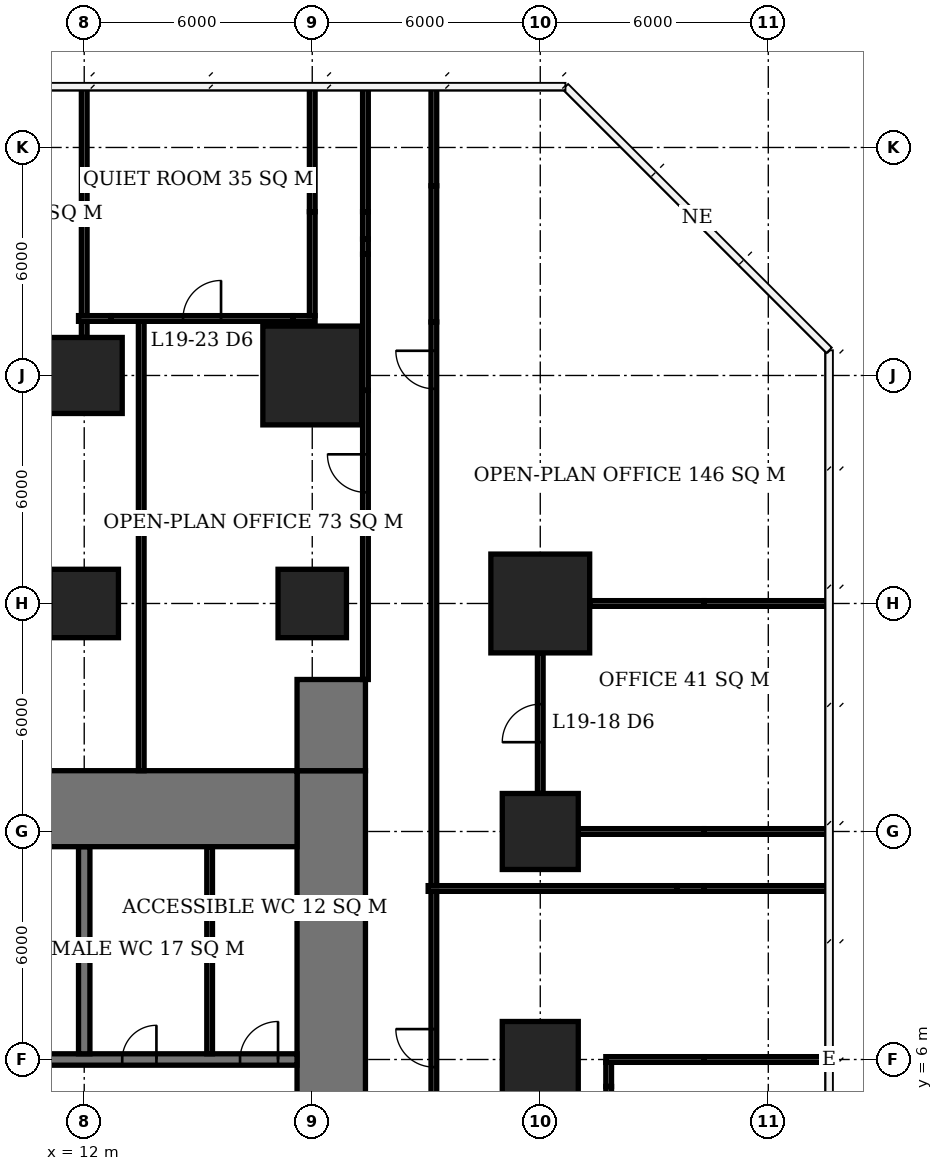
"""IFC4 building model, lengths in metres.
Left out: names, types, materials, properties, quantities, classifications, styles, units other than length and angle.
Written with IfcOpenShell. Run it as: python <this file> out.ifc"""

import sys

from ifc_helpers import new_model, si_unit, direction, frame, frame_2d, origin, origin_2d, place, context, subcontext, project, spatial, rectangle, extrude, element, fill, save


model = new_model("IFC4")
c1 = context("Model", 3, precision=1e-05, world=origin(), true_north=direction((0.0, 1.0)))
c2 = subcontext(c1, "Body", "Model", "MODEL_VIEW")
j1 = project(units=[si_unit("LENGTHUNIT", "METRE"), si_unit("PLANEANGLEUNIT", "RADIAN")], contexts=[c1])
p1 = place(None, origin())
s1 = spatial("IfcSite", under=j1, at=p1, CompositionType="ELEMENT")
p2 = place(p1, origin())
s2 = spatial("IfcBuilding", under=s1, at=p2, CompositionType="ELEMENT")
p3 = place(p2, frame((0.0, 0.0, 80.6)))
s3 = spatial("IfcBuildingStorey", under=s2, at=p3, CompositionType="ELEMENT", Elevation=80.6)
p4 = place(p3, frame((12.0, 18.0, 0.0), z_axis=(0.0, 0.0, 1.0), x_axis=(1.0, 0.0, 0.0)))
e1 = element("IfcColumn", 1, at=p4, inside=s3, PredefinedType="COLUMN", context=c2, shape_type="SweptSolid", body=[
    extrude(rectangle(XDim=1.8, YDim=1.8, at=origin_2d()), origin(), (0.0, 0.0, 1.0), 3.9),
])
p5 = place(p3, frame((12.0, 24.0, 0.0), z_axis=(0.0, 0.0, 1.0), x_axis=(1.0, 0.0, 0.0)))
e2 = element("IfcColumn", 2, at=p5, inside=s3, PredefinedType="COLUMN", context=c2, shape_type="SweptSolid", body=[
    extrude(rectangle(XDim=2.0, YDim=2.0, at=origin_2d()), origin(), (0.0, 0.0, 1.0), 3.9),
])
p6 = place(p3, frame((18.0, 18.0, 0.0), z_axis=(0.0, 0.0, 1.0), x_axis=(1.0, 0.0, 0.0)))
e3 = element("IfcColumn", 3, at=p6, inside=s3, PredefinedType="COLUMN", context=c2, shape_type="SweptSolid", body=[
    extrude(rectangle(XDim=1.8, YDim=1.8, at=origin_2d()), origin(), (0.0, 0.0, 1.0), 3.9),
])
p7 = place(p3, frame((18.0, 24.0, 0.0), z_axis=(0.0, 0.0, 1.0), x_axis=(1.0, 0.0, 0.0)))
e4 = element("IfcColumn", 4, at=p7, inside=s3, PredefinedType="COLUMN", context=c2, shape_type="SweptSolid", body=[
    extrude(rectangle(XDim=2.6, YDim=2.6, at=origin_2d()), origin(), (0.0, 0.0, 1.0), 3.9),
])
for number, where, z_axis, x_axis in (
    (5, (24.0, 6.0, 0.0), (0.0, 0.0, 1.0), (1.0, 0.0, 0.0)),
    (6, (24.0, 12.0, 0.0), (0.0, 0.0, 1.0), (1.0, 0.0, 0.0)),
):
    element("IfcColumn", number, at=place(p3, frame(where, z_axis=z_axis, x_axis=x_axis)), inside=s3, PredefinedType="COLUMN", context=c2, shape_type="SweptSolid", body=[
        extrude(rectangle(XDim=2.0, YDim=2.0, at=origin_2d()), origin(), (0.0, 0.0, 1.0), 3.9),
    ])
p8 = place(p3, frame((24.0, 18.0, 0.0), z_axis=(0.0, 0.0, 1.0), x_axis=(1.0, 0.0, 0.0)))
e7 = element("IfcColumn", 7, at=p8, inside=s3, PredefinedType="COLUMN", context=c2, shape_type="SweptSolid", body=[
    extrude(rectangle(XDim=2.6, YDim=2.6, at=origin_2d()), origin(), (0.0, 0.0, 1.0), 3.9),
])
p9 = place(p3, frame((-5.6, 12.6, 0.0), z_axis=(0.0, 0.0, 1.0), x_axis=(1.0, 0.0, 0.0)))
e8 = element("IfcWall", 8, at=p9, inside=s3, PredefinedType="SHEAR", context=c2, shape_type="SweptSolid", body=[
    extrude(rectangle(XDim=23.2, YDim=2.0, at=frame_2d((11.6, 0.0))), origin(), (0.0, 0.0, 1.0), 3.9),
])
p10 = place(p3, frame((18.5, -7.6, 0.0), z_axis=(0.0, 0.0, 1.0), x_axis=(0.0, 1.0, 0.0)))
e9 = element("IfcWall", 9, at=p10, inside=s3, PredefinedType="SHEAR", context=c2, shape_type="SweptSolid", body=[
    extrude(rectangle(XDim=21.2, YDim=1.8, at=frame_2d((10.6, 0.0))), origin(), (0.0, 0.0, 1.0), 3.9),
])
p11 = place(p10, frame((9.2, 0.0, 0.0)))
e10 = element("IfcOpeningElement", 10, at=p11, cuts=e9, PredefinedType="OPENING", context=c2, shape_type="SweptSolid", body=[
    extrude(rectangle(XDim=1.8, YDim=2.4, at=frame_2d((0.9, 1.2))), frame((0.0, 0.91, 0.0), z_axis=(0.0, -1.0, 0.0), x_axis=(1.0, 0.0, 0.0)), (0.0, 0.0, 1.0), 1.82),
])
p12 = place(p3, frame((18.5, 13.6, 0.0), z_axis=(0.0, 0.0, 1.0), x_axis=(0.0, 1.0, 0.0)))
e11 = element("IfcWall", 11, at=p12, inside=s3, PredefinedType="SHEAR", context=c2, shape_type="SweptSolid", body=[
    extrude(rectangle(XDim=2.4, YDim=1.8, at=frame_2d((1.2, 0.0))), origin(), (0.0, 0.0, 1.0), 3.9),
])
p13 = place(p3, frame((-0.15, 6.0, 0.0), z_axis=(0.0, 0.0, 1.0), x_axis=(1.0, 0.0, 0.0)))
e12 = element("IfcWall", 12, at=p13, inside=s3, PredefinedType="SHEAR", context=c2, shape_type="SweptSolid", body=[
    extrude(rectangle(XDim=17.75, YDim=0.3, at=frame_2d((8.875, 0.0))), origin(), (0.0, 0.0, 1.0), 3.9),
])
p14 = place(p13, frame((13.15, 0.0, 0.0)))
e13 = element("IfcOpeningElement", 13, at=p14, cuts=e12, PredefinedType="OPENING", context=c2, shape_type="SweptSolid", body=[
    extrude(rectangle(XDim=0.9, YDim=2.1, at=frame_2d((0.45, 1.05))), frame((0.0, 0.16, 0.0), z_axis=(0.0, -1.0, 0.0), x_axis=(1.0, 0.0, 0.0)), (0.0, 0.0, 1.0), 0.32),
])
p15 = place(p13, frame((16.25, 0.0, 0.0)))
e14 = element("IfcOpeningElement", 14, at=p15, cuts=e12, PredefinedType="OPENING", context=c2, shape_type="SweptSolid", body=[
    extrude(rectangle(XDim=1.0, YDim=2.1, at=frame_2d((0.5, 1.05))), frame((0.0, 0.16, 0.0), z_axis=(0.0, -1.0, 0.0), x_axis=(1.0, 0.0, 0.0)), (0.0, 0.0, 1.0), 0.32),
])
p16 = place(p13, frame((1.1, 0.0, 0.0)))
e15 = element("IfcOpeningElement", 15, at=p16, cuts=e12, PredefinedType="OPENING", context=c2, shape_type="SweptSolid", body=[
    extrude(rectangle(XDim=1.1, YDim=2.1, at=frame_2d((0.55, 1.05))), frame((0.0, 0.16, 0.0), z_axis=(0.0, -1.0, 0.0), x_axis=(1.0, 0.0, 0.0)), (0.0, 0.0, 1.0), 0.32),
])
p17 = place(p13, frame((4.1, 0.0, 0.0)))
e16 = element("IfcOpeningElement", 16, at=p17, cuts=e12, PredefinedType="OPENING", context=c2, shape_type="SweptSolid", body=[
    extrude(rectangle(XDim=1.1, YDim=2.1, at=frame_2d((0.55, 1.05))), frame((0.0, 0.16, 0.0), z_axis=(0.0, -1.0, 0.0), x_axis=(1.0, 0.0, 0.0)), (0.0, 0.0, 1.0), 0.32),
])
p18 = place(p13, frame((7.1, 0.0, 0.0)))
e17 = element("IfcOpeningElement", 17, at=p18, cuts=e12, PredefinedType="OPENING", context=c2, shape_type="SweptSolid", body=[
    extrude(rectangle(XDim=1.1, YDim=2.1, at=frame_2d((0.55, 1.05))), frame((0.0, 0.16, 0.0), z_axis=(0.0, -1.0, 0.0), x_axis=(1.0, 0.0, 0.0)), (0.0, 0.0, 1.0), 0.32),
])
p19 = place(p13, frame((10.1, 0.0, 0.0)))
e18 = element("IfcOpeningElement", 18, at=p19, cuts=e12, PredefinedType="OPENING", context=c2, shape_type="SweptSolid", body=[
    extrude(rectangle(XDim=1.1, YDim=2.1, at=frame_2d((0.55, 1.05))), frame((0.0, 0.16, 0.0), z_axis=(0.0, -1.0, 0.0), x_axis=(1.0, 0.0, 0.0)), (0.0, 0.0, 1.0), 0.32),
])
p20 = place(p3, frame((12.0, 6.15, 0.0), z_axis=(0.0, 0.0, 1.0), x_axis=(0.0, 1.0, 0.0)))
e19 = element("IfcWall", 19, at=p20, inside=s3, PredefinedType="SHEAR", context=c2, shape_type="SweptSolid", body=[
    extrude(rectangle(XDim=5.45, YDim=0.3, at=frame_2d((2.725, 0.0))), origin(), (0.0, 0.0, 1.0), 3.9),
])
p21 = place(p3, frame((15.3, 6.15, 0.0), z_axis=(0.0, 0.0, 1.0), x_axis=(0.0, 1.0, 0.0)))
e20 = element("IfcWall", 20, at=p21, inside=s3, PredefinedType="PLUMBINGWALL", context=c2, shape_type="SweptSolid", body=[
    extrude(rectangle(XDim=5.45, YDim=0.15, at=frame_2d((2.725, 0.0))), origin(), (0.0, 0.0, 1.0), 3.65),
])
p22 = place(p3, frame((25.725, 6.0, 0.0), z_axis=(0.0, 0.0, 1.0), x_axis=(1.0, 0.0, 0.0)))
e21 = element("IfcWall", 21, at=p22, inside=s3, PredefinedType="PARTITIONING", context=c2, shape_type="SweptSolid", body=[
    extrude(rectangle(XDim=2.585, YDim=0.15, at=frame_2d((1.292, 0.0))), origin(), (0.0, 0.0, 1.0), 2.65),
])
p23 = place(p3, frame((28.31, 6.0, 0.0), z_axis=(0.0, 0.0, 1.0), x_axis=(1.0, 0.0, 0.0)))
e22 = element("IfcWall", 22, at=p23, inside=s3, PredefinedType="PARTITIONING", context=c2, shape_type="SweptSolid", body=[
    extrude(rectangle(XDim=3.24, YDim=0.15, at=frame_2d((1.62, 0.0))), origin(), (0.0, 0.0, 1.0), 3.65),
])
p24 = place(p3, frame((25.0, 12.0, 0.0), z_axis=(0.0, 0.0, 1.0), x_axis=(1.0, 0.0, 0.0)))
e23 = element("IfcWall", 23, at=p24, inside=s3, PredefinedType="PARTITIONING", context=c2, shape_type="SweptSolid", body=[
    extrude(rectangle(XDim=3.31, YDim=0.15, at=frame_2d((1.655, 0.0))), origin(), (0.0, 0.0, 1.0), 2.65),
])
p25 = place(p3, frame((28.31, 12.0, 0.0), z_axis=(0.0, 0.0, 1.0), x_axis=(1.0, 0.0, 0.0)))
e24 = element("IfcWall", 24, at=p25, inside=s3, PredefinedType="PARTITIONING", context=c2, shape_type="SweptSolid", body=[
    extrude(rectangle(XDim=3.29, YDim=0.15, at=frame_2d((1.645, 0.0))), origin(), (0.0, 0.0, 1.0), 3.65),
])
p26 = place(p3, frame((25.3, 18.0, 0.0), z_axis=(0.0, 0.0, 1.0), x_axis=(1.0, 0.0, 0.0)))
e25 = element("IfcWall", 25, at=p26, inside=s3, PredefinedType="PARTITIONING", context=c2, shape_type="SweptSolid", body=[
    extrude(rectangle(XDim=3.01, YDim=0.15, at=frame_2d((1.505, 0.0))), origin(), (0.0, 0.0, 1.0), 2.65),
])
p27 = place(p3, frame((28.31, 18.0, 0.0), z_axis=(0.0, 0.0, 1.0), x_axis=(1.0, 0.0, 0.0)))
e26 = element("IfcWall", 26, at=p27, inside=s3, PredefinedType="PARTITIONING", context=c2, shape_type="SweptSolid", body=[
    extrude(rectangle(XDim=3.29, YDim=0.15, at=frame_2d((1.645, 0.0))), origin(), (0.0, 0.0, 1.0), 3.65),
])
p28 = place(p3, frame((11.85, 25.5, 0.0), z_axis=(0.0, 0.0, 1.0), x_axis=(1.0, 0.0, 0.0)))
e27 = element("IfcWall", 27, at=p28, inside=s3, PredefinedType="PARTITIONING", context=c2, shape_type="SweptSolid", body=[
    extrude(rectangle(XDim=0.86, YDim=0.15, at=frame_2d((0.43, 0.0))), origin(), (0.0, 0.0, 1.0), 2.65),
])
p29 = place(p3, frame((12.71, 25.5, 0.0), z_axis=(0.0, 0.0, 1.0), x_axis=(1.0, 0.0, 0.0)))
e28 = element("IfcWall", 28, at=p29, inside=s3, PredefinedType="PARTITIONING", context=c2, shape_type="SweptSolid", body=[
    extrude(rectangle(XDim=4.78, YDim=0.15, at=frame_2d((2.39, 0.0))), origin(), (0.0, 0.0, 1.0), 3.65),
])
p30 = place(p29, frame((1.89, 0.0, 0.0)))
e29 = element("IfcOpeningElement", 29, at=p30, cuts=e28, PredefinedType="OPENING", context=c2, shape_type="SweptSolid", body=[
    extrude(rectangle(XDim=1.0, YDim=2.1, at=frame_2d((0.5, 1.05))), frame((0.0, 0.085, 0.0), z_axis=(0.0, -1.0, 0.0), x_axis=(1.0, 0.0, 0.0)), (0.0, 0.0, 1.0), 0.17),
])
p31 = place(p3, frame((17.49, 25.5, 0.0), z_axis=(0.0, 0.0, 1.0), x_axis=(1.0, 0.0, 0.0)))
e30 = element("IfcWall", 30, at=p31, inside=s3, PredefinedType="PARTITIONING", context=c2, shape_type="SweptSolid", body=[
    extrude(rectangle(XDim=0.585, YDim=0.15, at=frame_2d((0.292, 0.0))), origin(), (0.0, 0.0, 1.0), 2.65),
])
p32 = place(p3, frame((12.0, 25.0, 0.0), z_axis=(0.0, 0.0, 1.0), x_axis=(0.0, 1.0, 0.0)))
e31 = element("IfcWall", 31, at=p32, inside=s3, PredefinedType="PARTITIONING", context=c2, shape_type="SweptSolid", body=[
    extrude(rectangle(XDim=0.425, YDim=0.15, at=frame_2d((0.212, 0.0))), origin(), (0.0, 0.0, 1.0), 2.65),
])
p33 = place(p3, frame((12.0, 25.575, 0.0), z_axis=(0.0, 0.0, 1.0), x_axis=(0.0, 1.0, 0.0)))
e32 = element("IfcWall", 32, at=p33, inside=s3, PredefinedType="PARTITIONING", context=c2, shape_type="SweptSolid", body=[
    extrude(rectangle(XDim=2.735, YDim=0.15, at=frame_2d((1.368, 0.0))), origin(), (0.0, 0.0, 1.0), 2.65),
])
p34 = place(p3, frame((12.0, 28.31, 0.0), z_axis=(0.0, 0.0, 1.0), x_axis=(0.0, 1.0, 0.0)))
e33 = element("IfcWall", 33, at=p34, inside=s3, PredefinedType="PARTITIONING", context=c2, shape_type="SweptSolid", body=[
    extrude(rectangle(XDim=3.29, YDim=0.15, at=frame_2d((1.645, 0.0))), origin(), (0.0, 0.0, 1.0), 3.65),
])
p35 = place(p3, frame((18.0, 25.575, 0.0), z_axis=(0.0, 0.0, 1.0), x_axis=(0.0, 1.0, 0.0)))
e34 = element("IfcWall", 34, at=p35, inside=s3, PredefinedType="PARTITIONING", context=c2, shape_type="SweptSolid", body=[
    extrude(rectangle(XDim=2.735, YDim=0.15, at=frame_2d((1.368, 0.0))), origin(), (0.0, 0.0, 1.0), 2.65),
])
p36 = place(p3, frame((18.0, 28.31, 0.0), z_axis=(0.0, 0.0, 1.0), x_axis=(0.0, 1.0, 0.0)))
e35 = element("IfcWall", 35, at=p36, inside=s3, PredefinedType="PARTITIONING", context=c2, shape_type="SweptSolid", body=[
    extrude(rectangle(XDim=3.29, YDim=0.15, at=frame_2d((1.645, 0.0))), origin(), (0.0, 0.0, 1.0), 3.65),
])
p37 = place(p3, frame((24.0, 13.0, 0.0), z_axis=(0.0, 0.0, 1.0), x_axis=(0.0, 1.0, 0.0)))
e36 = element("IfcWall", 36, at=p37, inside=s3, PredefinedType="PARTITIONING", context=c2, shape_type="SweptSolid", body=[
    extrude(rectangle(XDim=3.7, YDim=0.15, at=frame_2d((1.85, 0.0))), origin(), (0.0, 0.0, 1.0), 3.65),
])
p38 = place(p37, frame((1.35, 0.0, 0.0)))
e37 = element("IfcOpeningElement", 37, at=p38, cuts=e36, PredefinedType="OPENING", context=c2, shape_type="SweptSolid", body=[
    extrude(rectangle(XDim=1.0, YDim=2.1, at=frame_2d((0.5, 1.05))), frame((0.0, 0.085, 0.0), z_axis=(0.0, -1.0, 0.0), x_axis=(1.0, 0.0, 0.0)), (0.0, 0.0, 1.0), 0.17),
])
p39 = place(p3, frame((25.8, 0.71, 0.0), z_axis=(0.0, 0.0, 1.0), x_axis=(0.0, 1.0, 0.0)))
e38 = element("IfcWall", 38, at=p39, inside=s3, PredefinedType="PARTITIONING", context=c2, shape_type="SweptSolid", body=[
    extrude(rectangle(XDim=4.58, YDim=0.15, at=frame_2d((2.29, 0.0))), origin(), (0.0, 0.0, 1.0), 3.65),
])
p40 = place(p39, frame((1.79, 0.0, 0.0)))
e39 = element("IfcOpeningElement", 39, at=p40, cuts=e38, PredefinedType="OPENING", context=c2, shape_type="SweptSolid", body=[
    extrude(rectangle(XDim=1.0, YDim=2.1, at=frame_2d((0.5, 1.05))), frame((0.0, 0.085, 0.0), z_axis=(0.0, -1.0, 0.0), x_axis=(1.0, 0.0, 0.0)), (0.0, 0.0, 1.0), 0.17),
])
p41 = place(p3, frame((25.8, 5.29, 0.0), z_axis=(0.0, 0.0, 1.0), x_axis=(0.0, 1.0, 0.0)))
e40 = element("IfcWall", 40, at=p41, inside=s3, PredefinedType="PARTITIONING", context=c2, shape_type="SweptSolid", body=[
    extrude(rectangle(XDim=0.635, YDim=0.15, at=frame_2d((0.317, 0.0))), origin(), (0.0, 0.0, 1.0), 2.65),
])
p42 = place(p3, frame((13.5, 13.6, 0.0), z_axis=(0.0, 0.0, 1.0), x_axis=(0.0, 1.0, 0.0)))
e41 = element("IfcWall", 41, at=p42, inside=s3, PredefinedType="PARTITIONING", context=c2, shape_type="SweptSolid", body=[
    extrude(rectangle(XDim=11.825, YDim=0.15, at=frame_2d((5.913, 0.0))), origin(), (0.0, 0.0, 1.0), 3.65),
])
p43 = place(p3, frame((19.4, 16.0, 0.0), z_axis=(0.0, 0.0, 1.0), x_axis=(0.0, 1.0, 0.0)))
e42 = element("IfcWall", 42, at=p43, inside=s3, PredefinedType="PARTITIONING", context=c2, shape_type="SweptSolid", body=[
    extrude(rectangle(XDim=7.608, YDim=0.15, at=frame_2d((3.804, 0.0))), origin(), (0.0, 0.0, 1.0), 3.65),
])
p44 = place(p43, frame((4.925, 0.0, 0.0)))
e43 = element("IfcOpeningElement", 43, at=p44, cuts=e42, PredefinedType="OPENING", context=c2, shape_type="SweptSolid", body=[
    extrude(rectangle(XDim=1.0, YDim=2.1, at=frame_2d((0.5, 1.05))), frame((0.0, 0.085, 0.0), z_axis=(0.0, -1.0, 0.0), x_axis=(1.0, 0.0, 0.0)), (0.0, 0.0, 1.0), 0.17),
])
p45 = place(p3, frame((19.4, 23.608, 0.0), z_axis=(0.0, 0.0, 1.0), x_axis=(0.0, 1.0, 0.0)))
e44 = element("IfcWall", 44, at=p45, inside=s3, PredefinedType="PARTITIONING", context=c2, shape_type="SweptSolid", body=[
    extrude(rectangle(XDim=3.584, YDim=0.15, at=frame_2d((1.792, 0.0))), origin(), (0.0, 0.0, 1.0), 2.65),
])
p46 = place(p3, frame((19.4, 27.192, 0.0), z_axis=(0.0, 0.0, 1.0), x_axis=(0.0, 1.0, 0.0)))
e45 = element("IfcWall", 45, at=p46, inside=s3, PredefinedType="PARTITIONING", context=c2, shape_type="SweptSolid", body=[
    extrude(rectangle(XDim=0.398, YDim=0.15, at=frame_2d((0.199, 0.0))), origin(), (0.0, 0.0, 1.0), 3.65),
])
p47 = place(p3, frame((19.4, 27.59, 0.0), z_axis=(0.0, 0.0, 1.0), x_axis=(0.0, 1.0, 0.0)))
e46 = element("IfcWall", 46, at=p47, inside=s3, PredefinedType="PARTITIONING", context=c2, shape_type="SweptSolid", body=[
    extrude(rectangle(XDim=0.72, YDim=0.15, at=frame_2d((0.36, 0.0))), origin(), (0.0, 0.0, 1.0), 2.65),
])
p48 = place(p3, frame((19.4, 28.31, 0.0), z_axis=(0.0, 0.0, 1.0), x_axis=(0.0, 1.0, 0.0)))
e47 = element("IfcWall", 47, at=p48, inside=s3, PredefinedType="PARTITIONING", context=c2, shape_type="SweptSolid", body=[
    extrude(rectangle(XDim=3.29, YDim=0.15, at=frame_2d((1.645, 0.0))), origin(), (0.0, 0.0, 1.0), 3.65),
])
p49 = place(p3, frame((21.2, -1.425, 0.0), z_axis=(0.0, 0.0, 1.0), x_axis=(0.0, 1.0, 0.0)))
e48 = element("IfcWall", 48, at=p49, inside=s3, PredefinedType="PARTITIONING", context=c2, shape_type="SweptSolid", body=[
    extrude(rectangle(XDim=11.85, YDim=0.15, at=frame_2d((5.925, 0.0))), origin(), (0.0, 0.0, 1.0), 3.65),
])
p50 = place(p49, frame((7.225, 0.0, 0.0)))
e49 = element("IfcOpeningElement", 49, at=p50, cuts=e48, PredefinedType="OPENING", context=c2, shape_type="SweptSolid", body=[
    extrude(rectangle(XDim=1.0, YDim=2.1, at=frame_2d((0.5, 1.05))), frame((0.0, 0.085, 0.0), z_axis=(0.0, -1.0, 0.0), x_axis=(1.0, 0.0, 0.0)), (0.0, 0.0, 1.0), 0.17),
])
p51 = place(p3, frame((21.2, 10.575, 0.0), z_axis=(0.0, 0.0, 1.0), x_axis=(0.0, 1.0, 0.0)))
e50 = element("IfcWall", 50, at=p51, inside=s3, PredefinedType="PARTITIONING", context=c2, shape_type="SweptSolid", body=[
    extrude(rectangle(XDim=14.833, YDim=0.15, at=frame_2d((7.417, 0.0))), origin(), (0.0, 0.0, 1.0), 3.65),
])
p52 = place(p51, frame((13.075, 0.0, 0.0)))
e51 = element("IfcOpeningElement", 51, at=p52, cuts=e50, PredefinedType="OPENING", context=c2, shape_type="SweptSolid", body=[
    extrude(rectangle(XDim=1.0, YDim=2.1, at=frame_2d((0.5, 1.05))), frame((0.0, 0.085, 0.0), z_axis=(0.0, -1.0, 0.0), x_axis=(1.0, 0.0, 0.0)), (0.0, 0.0, 1.0), 0.17),
])
p53 = place(p3, frame((21.2, 25.408, 0.0), z_axis=(0.0, 0.0, 1.0), x_axis=(0.0, 1.0, 0.0)))
e52 = element("IfcWall", 52, at=p53, inside=s3, PredefinedType="PARTITIONING", context=c2, shape_type="SweptSolid", body=[
    extrude(rectangle(XDim=3.584, YDim=0.15, at=frame_2d((1.792, 0.0))), origin(), (0.0, 0.0, 1.0), 2.65),
])
p54 = place(p3, frame((21.2, 28.992, 0.0), z_axis=(0.0, 0.0, 1.0), x_axis=(0.0, 1.0, 0.0)))
e53 = element("IfcWall", 53, at=p54, inside=s3, PredefinedType="PARTITIONING", context=c2, shape_type="SweptSolid", body=[
    extrude(rectangle(XDim=2.608, YDim=0.15, at=frame_2d((1.304, 0.0))), origin(), (0.0, 0.0, 1.0), 3.65),
])
p55 = place(p3, frame((21.05, 10.5, 0.0), z_axis=(0.0, 0.0, 1.0), x_axis=(1.0, 0.0, 0.0)))
e54 = element("IfcWall", 54, at=p55, inside=s3, PredefinedType="PARTITIONING", context=c2, shape_type="SweptSolid", body=[
    extrude(rectangle(XDim=6.54, YDim=0.15, at=frame_2d((3.27, 0.0))), origin(), (0.0, 0.0, 1.0), 3.65),
])
p56 = place(p3, frame((27.59, 10.5, 0.0), z_axis=(0.0, 0.0, 1.0), x_axis=(1.0, 0.0, 0.0)))
e55 = element("IfcWall", 55, at=p56, inside=s3, PredefinedType="PARTITIONING", context=c2, shape_type="SweptSolid", body=[
    extrude(rectangle(XDim=0.72, YDim=0.15, at=frame_2d((0.36, 0.0))), origin(), (0.0, 0.0, 1.0), 2.65),
])
p57 = place(p3, frame((28.31, 10.5, 0.0), z_axis=(0.0, 0.0, 1.0), x_axis=(1.0, 0.0, 0.0)))
e56 = element("IfcWall", 56, at=p57, inside=s3, PredefinedType="PARTITIONING", context=c2, shape_type="SweptSolid", body=[
    extrude(rectangle(XDim=3.29, YDim=0.15, at=frame_2d((1.645, 0.0))), origin(), (0.0, 0.0, 1.0), 3.65),
])
p58 = place(p14, origin())
e57 = element("IfcDoor", 57, at=p58, inside=s3, OperationType="SINGLE_SWING_RIGHT", PredefinedType="DOOR", context=c2, shape_type="SweptSolid", body=[
    extrude(rectangle(XDim=0.9, YDim=2.1, at=frame_2d((0.45, 1.05))), frame((0.0, 0.025, 0.0), z_axis=(0.0, -1.0, 0.0), x_axis=(1.0, 0.0, 0.0)), (0.0, 0.0, 1.0), 0.05),
])
fill(e13, e57)
p59 = place(p15, origin())
e58 = element("IfcDoor", 58, at=p59, inside=s3, OperationType="SINGLE_SWING_RIGHT", PredefinedType="DOOR", context=c2, shape_type="SweptSolid", body=[
    extrude(rectangle(XDim=1.0, YDim=2.1, at=frame_2d((0.5, 1.05))), frame((0.0, 0.025, 0.0), z_axis=(0.0, -1.0, 0.0), x_axis=(1.0, 0.0, 0.0)), (0.0, 0.0, 1.0), 0.05),
])
fill(e14, e58)
p60 = place(p38, origin())
e59 = element("IfcDoor", 59, at=p60, inside=s3, OperationType="SINGLE_SWING_LEFT", PredefinedType="DOOR", context=c2, shape_type="SweptSolid", body=[
    extrude(rectangle(XDim=1.0, YDim=2.1, at=frame_2d((0.5, 1.05))), frame((0.0, 0.025, 0.0), z_axis=(0.0, -1.0, 0.0), x_axis=(1.0, 0.0, 0.0)), (0.0, 0.0, 1.0), 0.05),
])
fill(e37, e59)
p61 = place(p30, origin())
e60 = element("IfcDoor", 60, at=p61, inside=s3, OperationType="SINGLE_SWING_RIGHT", PredefinedType="DOOR", context=c2, shape_type="SweptSolid", body=[
    extrude(rectangle(XDim=1.0, YDim=2.1, at=frame_2d((0.5, 1.05))), frame((0.0, 0.025, 0.0), z_axis=(0.0, -1.0, 0.0), x_axis=(1.0, 0.0, 0.0)), (0.0, 0.0, 1.0), 0.05),
])
fill(e29, e60)
p62 = place(p50, origin())
e61 = element("IfcDoor", 61, at=p62, inside=s3, OperationType="SINGLE_SWING_RIGHT", PredefinedType="DOOR", context=c2, shape_type="SweptSolid", body=[
    extrude(rectangle(XDim=1.0, YDim=2.1, at=frame_2d((0.5, 1.05))), frame((0.0, 0.025, 0.0), z_axis=(0.0, -1.0, 0.0), x_axis=(1.0, 0.0, 0.0)), (0.0, 0.0, 1.0), 0.05),
])
fill(e49, e61)
p63 = place(p44, origin())
e62 = element("IfcDoor", 62, at=p63, inside=s3, OperationType="SINGLE_SWING_RIGHT", PredefinedType="DOOR", context=c2, shape_type="SweptSolid", body=[
    extrude(rectangle(XDim=1.0, YDim=2.1, at=frame_2d((0.5, 1.05))), frame((0.0, 0.025, 0.0), z_axis=(0.0, -1.0, 0.0), x_axis=(1.0, 0.0, 0.0)), (0.0, 0.0, 1.0), 0.05),
])
fill(e43, e62)
p64 = place(p52, origin())
e63 = element("IfcDoor", 63, at=p64, inside=s3, OperationType="SINGLE_SWING_RIGHT", PredefinedType="DOOR", context=c2, shape_type="SweptSolid", body=[
    extrude(rectangle(XDim=1.0, YDim=2.1, at=frame_2d((0.5, 1.05))), frame((0.0, 0.025, 0.0), z_axis=(0.0, -1.0, 0.0), x_axis=(1.0, 0.0, 0.0)), (0.0, 0.0, 1.0), 0.05),
])
fill(e51, e63)
save(model, sys.argv[1])
